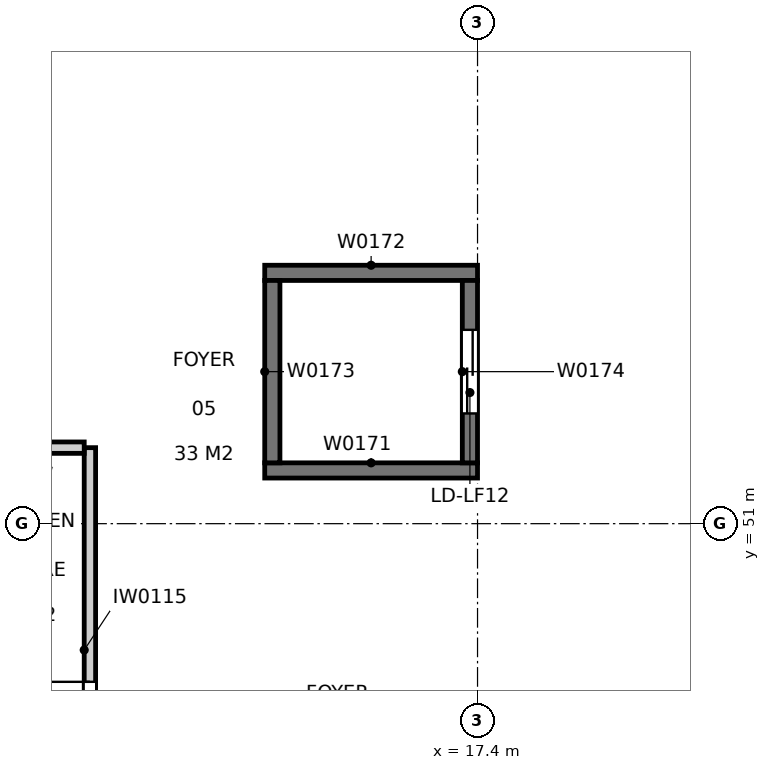
"""IFC4 building model, lengths in metres.
Left out: names, types, materials, properties, quantities, classifications, styles, units other than length and angle.
Written with IfcOpenShell. Run it as: python <this file> out.ifc"""

import sys

from ifc_helpers import new_model, si_unit, direction, frame, frame_2d, origin, place, context, subcontext, project, spatial, rectangle, extrude, element, fill, save


model = new_model("IFC4")
c1 = context("Model", 3, precision=1e-05, world=origin(), true_north=direction((0.0, 1.0)))
c2 = subcontext(c1, "Body", "Model", "MODEL_VIEW")
j1 = project(units=[si_unit("LENGTHUNIT", "METRE"), si_unit("PLANEANGLEUNIT", "RADIAN")], contexts=[c1])
p1 = place(None, origin())
s1 = spatial("IfcSite", under=j1, at=p1, CompositionType="ELEMENT")
p2 = place(p1, origin())
s2 = spatial("IfcBuilding", under=s1, at=p2, CompositionType="ELEMENT")
p3 = place(p2, frame((0.0, 0.0, 9.6)))
s3 = spatial("IfcBuildingStorey", under=s2, at=p3, CompositionType="ELEMENT", Elevation=9.6)
for number, where, z_axis, x_axis in (
    (1, (14.6, 51.7, 0.0), (0.0, 0.0, 1.0), (1.0, 0.0, 0.0)),
    (2, (14.6, 54.3, 0.0), (0.0, 0.0, 1.0), (1.0, 0.0, 0.0)),
):
    element("IfcWall", number, at=place(p3, frame(where, z_axis=z_axis, x_axis=x_axis)), inside=s3, PredefinedType="SOLIDWALL", context=c2, shape_type="SweptSolid", body=[
        extrude(rectangle(XDim=2.8, YDim=0.2, at=frame_2d((1.4, 0.0))), origin(), (0.0, 0.0, 1.0), 4.8),
    ])
p4 = place(p3, frame((14.7, 51.8, 0.0), z_axis=(0.0, 0.0, 1.0), x_axis=(0.0, 1.0, 0.0)))
e3 = element("IfcWall", 3, at=p4, inside=s3, PredefinedType="SOLIDWALL", context=c2, shape_type="SweptSolid", body=[
    extrude(rectangle(XDim=2.4, YDim=0.2, at=frame_2d((1.2, 0.0))), origin(), (0.0, 0.0, 1.0), 4.8),
])
p5 = place(p3, frame((17.3, 51.8, 0.0), z_axis=(0.0, 0.0, 1.0), x_axis=(0.0, 1.0, 0.0)))
e4 = element("IfcWall", 4, at=p5, inside=s3, PredefinedType="SOLIDWALL", context=c2, shape_type="SweptSolid", body=[
    extrude(rectangle(XDim=2.4, YDim=0.2, at=frame_2d((1.2, 0.0))), origin(), (0.0, 0.0, 1.0), 4.8),
])
p6 = place(p5, frame((0.65, 0.0, 0.0)))
e5 = element("IfcOpeningElement", 5, at=p6, cuts=e4, PredefinedType="OPENING", context=c2, shape_type="SweptSolid", body=[
    extrude(rectangle(XDim=1.1, YDim=2.1, at=frame_2d((0.55, 1.05))), frame((0.0, 0.11, 0.0), z_axis=(0.0, -1.0, 0.0), x_axis=(1.0, 0.0, 0.0)), (0.0, 0.0, 1.0), 0.22),
])
p7 = place(p3, frame((12.3, 46.675, 0.0), z_axis=(0.0, 0.0, 1.0), x_axis=(0.0, 1.0, 0.0)))
e6 = element("IfcWall", 6, at=p7, inside=s3, PredefinedType="PARTITIONING", context=c2, shape_type="SweptSolid", body=[
    extrude(rectangle(XDim=5.325, YDim=0.15, at=frame_2d((2.663, 0.0))), origin(), (0.0, 0.0, 1.0), 3.75),
])
p8 = place(p7, frame((1.244, 0.0, 0.0)))
e7 = element("IfcOpeningElement", 7, at=p8, cuts=e6, PredefinedType="OPENING", context=c2, shape_type="SweptSolid", body=[
    extrude(rectangle(XDim=1.0, YDim=2.1, at=frame_2d((0.5, 1.05))), frame((0.0, 0.085, 0.0), z_axis=(0.0, -1.0, 0.0), x_axis=(1.0, 0.0, 0.0)), (0.0, 0.0, 1.0), 0.17),
])
p9 = place(p3, frame((12.225, 52.0, 0.0), z_axis=(0.0, 0.0, 1.0), x_axis=(-1.0, 0.0, 0.0)))
e8 = element("IfcWall", 8, at=p9, inside=s3, PredefinedType="PARTITIONING", context=c2, shape_type="SweptSolid", body=[
    extrude(rectangle(XDim=1.742, YDim=0.15, at=frame_2d((0.871, 0.0))), origin(), (0.0, 0.0, 1.0), 3.75),
])
p10 = place(p8, origin())
e9 = element("IfcDoor", 9, at=p10, inside=s3, OperationType="SINGLE_SWING_RIGHT", PredefinedType="DOOR", context=c2, shape_type="SweptSolid", body=[
    extrude(rectangle(XDim=1.0, YDim=2.1, at=frame_2d((0.5, 1.05))), frame((0.0, 0.025, 0.0), z_axis=(0.0, -1.0, 0.0), x_axis=(1.0, 0.0, 0.0)), (0.0, 0.0, 1.0), 0.05),
])
fill(e7, e9)
p11 = place(p6, origin())
e10 = element("IfcDoor", 10, at=p11, inside=s3, OperationType="SLIDING_TO_LEFT", PredefinedType="DOOR", context=c2, shape_type="SweptSolid", body=[
    extrude(rectangle(XDim=1.1, YDim=2.1, at=frame_2d((0.55, 1.05))), frame((0.0, 0.025, 0.0), z_axis=(0.0, -1.0, 0.0), x_axis=(1.0, 0.0, 0.0)), (0.0, 0.0, 1.0), 0.05),
])
fill(e5, e10)
save(model, sys.argv[1])
